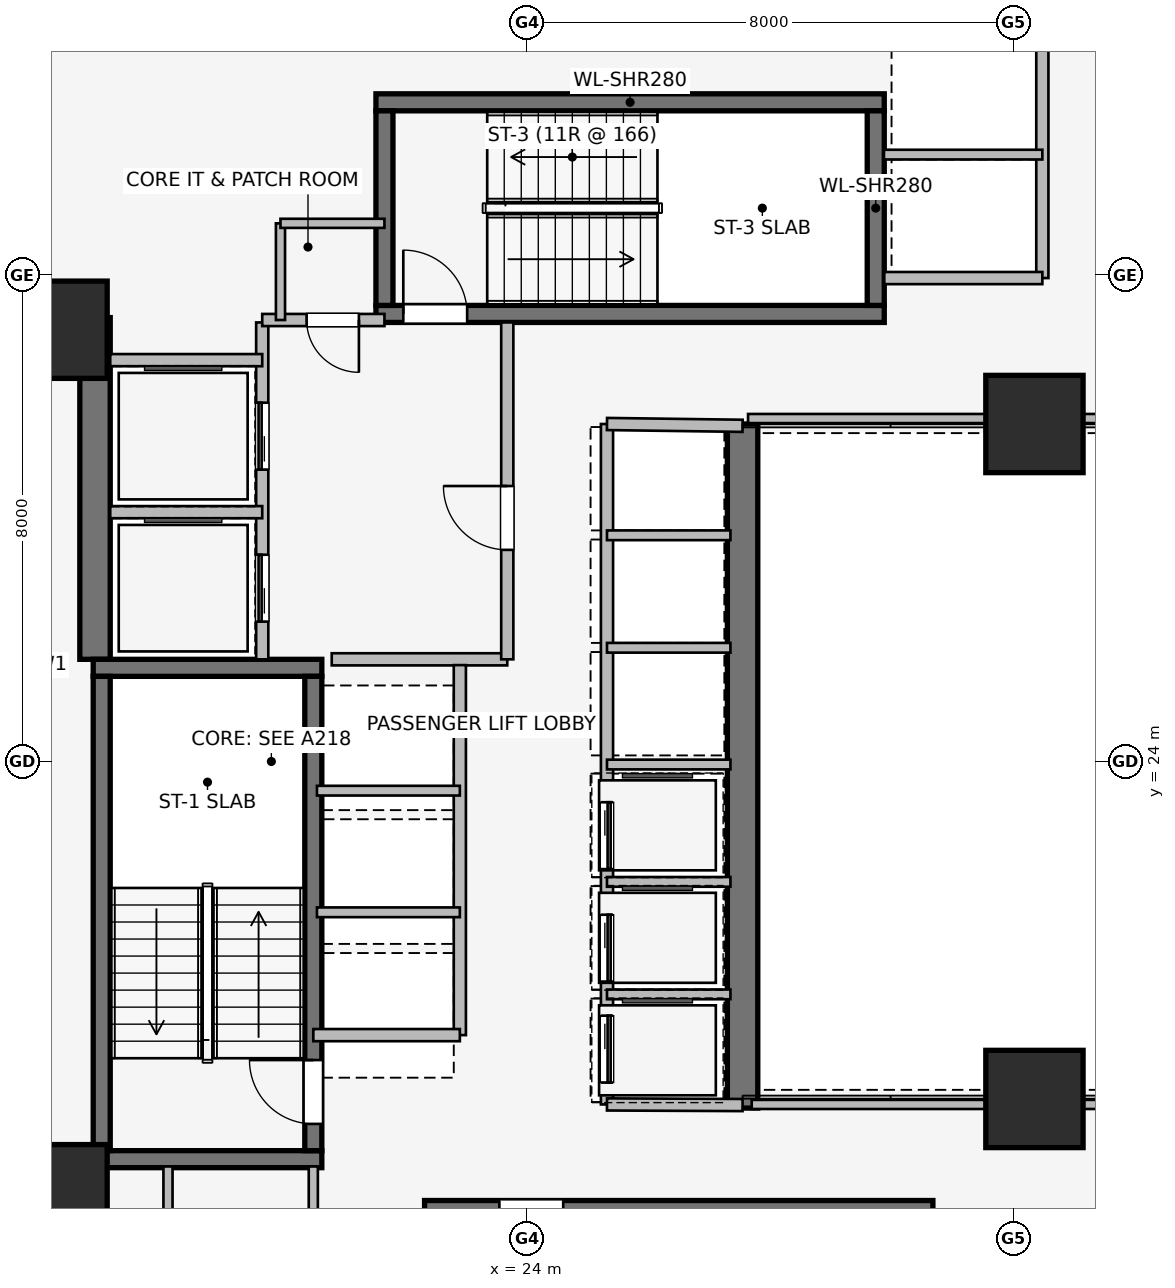
"""IFC4 building model, lengths in metres.
Left out: names, types, materials, properties, quantities, classifications, styles, units other than length and angle.
Written with IfcOpenShell. Run it as: python <this file> out.ifc"""

import sys

from ifc_helpers import new_model, si_unit, direction, frame, frame_2d, origin, origin_2d, place, context, subcontext, project, spatial, rectangle, extrude, element, fill, save


model = new_model("IFC4")
c1 = context("Model", 3, precision=1e-05, world=origin(), true_north=direction((0.0, 1.0)))
c2 = subcontext(c1, "Body", "Model", "MODEL_VIEW")
j1 = project(units=[si_unit("LENGTHUNIT", "METRE"), si_unit("PLANEANGLEUNIT", "RADIAN")], contexts=[c1])
p1 = place(None, origin())
s1 = spatial("IfcSite", under=j1, at=p1, CompositionType="ELEMENT")
p2 = place(p1, origin())
s2 = spatial("IfcBuilding", under=s1, at=p2, CompositionType="ELEMENT")
p3 = place(p2, frame((0.0, 0.0, 63.5)))
s3 = spatial("IfcBuildingStorey", under=s2, at=p3, CompositionType="ELEMENT", Elevation=63.5)
p4 = place(p3, frame((16.9, 25.68, 0.0), z_axis=(0.0, 0.0, 1.0), x_axis=(0.0, 1.0, 0.0)))
e1 = element("IfcWall", 1, at=p4, inside=s3, PredefinedType="SHEAR", context=c2, shape_type="SweptSolid", body=[
    extrude(rectangle(XDim=5.62, YDim=0.5, at=frame_2d((2.81, 0.0))), origin(), (0.0, 0.0, 1.0), 3.65),
])
p5 = place(p3, frame((27.55, 29.55, 0.0), z_axis=(0.0, 0.0, 1.0), x_axis=(0.0, -1.0, 0.0)))
e2 = element("IfcWall", 2, at=p5, inside=s3, PredefinedType="SHEAR", context=c2, shape_type="SweptSolid", body=[
    extrude(rectangle(XDim=11.25, YDim=0.5, at=frame_2d((5.625, 0.0))), origin(), (0.0, 0.0, 1.0), 3.65),
])
for number, where, z_axis, x_axis in (
    (3, (16.87, 17.46, 0.0), (0.0, 0.0, 1.0), (1.0, 0.0, 0.0)),
    (4, (20.63, 25.54, 0.0), (0.0, 0.0, 1.0), (-1.0, 0.0, 0.0)),
):
    element("IfcWall", number, at=place(p3, frame(where, z_axis=z_axis, x_axis=x_axis)), inside=s3, PredefinedType="SHEAR", context=c2, shape_type="SweptSolid", body=[
        extrude(rectangle(XDim=3.76, YDim=0.28, at=frame_2d((1.88, 0.0))), origin(), (0.0, 0.0, 1.0), 3.65),
    ])
p6 = place(p3, frame((17.01, 25.4, 0.0), z_axis=(0.0, 0.0, 1.0), x_axis=(0.0, -1.0, 0.0)))
e5 = element("IfcWall", 5, at=p6, inside=s3, PredefinedType="SHEAR", context=c2, shape_type="SweptSolid", body=[
    extrude(rectangle(XDim=7.8, YDim=0.28, at=frame_2d((3.9, 0.0))), origin(), (0.0, 0.0, 1.0), 3.65),
])
p7 = place(p3, frame((20.49, 17.6, 0.0), z_axis=(0.0, 0.0, 1.0), x_axis=(0.0, 1.0, 0.0)))
e6 = element("IfcWall", 6, at=p7, inside=s3, PredefinedType="SHEAR", context=c2, shape_type="SweptSolid", body=[
    extrude(rectangle(XDim=7.8, YDim=0.28, at=frame_2d((3.9, 0.0))), origin(), (0.0, 0.0, 1.0), 3.65),
])
p8 = place(p7, frame((0.44, 0.0, 0.0)))
e7 = element("IfcOpeningElement", 7, at=p8, cuts=e6, PredefinedType="OPENING", context=c2, shape_type="SweptSolid", body=[
    extrude(rectangle(XDim=1.05, YDim=2.0, at=frame_2d((0.525, 1.0))), frame((0.0, 0.15, 0.0), z_axis=(0.0, -1.0, 0.0), x_axis=(1.0, 0.0, 0.0)), (0.0, 0.0, 1.0), 0.3),
])
p9 = place(p3, frame((30.68, 16.64, 0.0), z_axis=(0.0, 0.0, 1.0), x_axis=(-1.0, 0.0, 0.0)))
e8 = element("IfcWall", 8, at=p9, inside=s3, PredefinedType="SHEAR", context=c2, shape_type="SweptSolid", body=[
    extrude(rectangle(XDim=8.36, YDim=0.28, at=frame_2d((4.18, 0.0))), origin(), (0.0, 0.0, 1.0), 3.65),
])
p10 = place(p9, frame((6.08, 0.0, 0.0)))
e9 = element("IfcOpeningElement", 9, at=p10, cuts=e8, PredefinedType="OPENING", context=c2, shape_type="SweptSolid", body=[
    extrude(rectangle(XDim=1.05, YDim=2.0, at=frame_2d((0.525, 1.0))), frame((0.0, 0.15, 0.0), z_axis=(0.0, -1.0, 0.0), x_axis=(1.0, 0.0, 0.0)), (0.0, 0.0, 1.0), 0.3),
])
p11 = place(p3, frame((21.52, 31.36, 0.0), z_axis=(0.0, 0.0, 1.0), x_axis=(1.0, 0.0, 0.0)))
e10 = element("IfcWall", 10, at=p11, inside=s3, PredefinedType="SHEAR", context=c2, shape_type="SweptSolid", body=[
    extrude(rectangle(XDim=8.36, YDim=0.28, at=frame_2d((4.18, 0.0))), origin(), (0.0, 0.0, 1.0), 3.65),
])
p12 = place(p11, frame((0.45, 0.0, 0.0)))
e11 = element("IfcOpeningElement", 11, at=p12, cuts=e10, PredefinedType="OPENING", context=c2, shape_type="SweptSolid", body=[
    extrude(rectangle(XDim=1.05, YDim=2.0, at=frame_2d((0.525, 1.0))), frame((0.0, 0.15, 0.0), z_axis=(0.0, -1.0, 0.0), x_axis=(1.0, 0.0, 0.0)), (0.0, 0.0, 1.0), 0.3),
])
p13 = place(p3, frame((29.88, 34.84, 0.0), z_axis=(0.0, 0.0, 1.0), x_axis=(-1.0, 0.0, 0.0)))
e12 = element("IfcWall", 12, at=p13, inside=s3, PredefinedType="SHEAR", context=c2, shape_type="SweptSolid", body=[
    extrude(rectangle(XDim=8.36, YDim=0.28, at=frame_2d((4.18, 0.0))), origin(), (0.0, 0.0, 1.0), 3.65),
])
for number, where, z_axis, x_axis in (
    (13, (21.66, 34.7, 0.0), (0.0, 0.0, 1.0), (0.0, -1.0, 0.0)),
    (14, (29.74, 31.5, 0.0), (0.0, 0.0, 1.0), (0.0, 1.0, 0.0)),
):
    element("IfcWall", number, at=place(p3, frame(where, z_axis=z_axis, x_axis=x_axis)), inside=s3, PredefinedType="SHEAR", context=c2, shape_type="SweptSolid", body=[
        extrude(rectangle(XDim=3.2, YDim=0.28, at=frame_2d((1.6, 0.0))), origin(), (0.0, 0.0, 1.0), 3.65),
    ])
for number, where, z_axis, x_axis in (
    (15, (16.3, 16.9, 0.0), (0.0, 0.0, 1.0), (1.0, 0.0, 0.0)),
    (16, (16.3, 31.1, 0.0), (0.0, 0.0, 1.0), (1.0, 0.0, 0.0)),
    (17, (32.35, 18.45, 0.0), (0.0, 0.0, 1.0), (1.0, 0.0, 0.0)),
    (18, (32.35, 29.55, 0.0), (0.0, 0.0, 1.0), (1.0, 0.0, 0.0)),
):
    element("IfcColumn", number, at=place(p3, frame(where, z_axis=z_axis, x_axis=x_axis)), inside=s3, PredefinedType="COLUMN", context=c2, shape_type="SweptSolid", body=[
        extrude(rectangle(XDim=1.6, YDim=1.6, at=origin_2d()), origin(), (0.0, 0.0, 1.0), 3.65),
    ])
p14 = place(p3, frame((19.65, 25.68, 0.0), z_axis=(0.0, 0.0, 1.0), x_axis=(0.0, 1.0, 0.0)))
e19 = element("IfcWall", 19, at=p14, inside=s3, PredefinedType="PARTITIONING", context=c2, shape_type="SweptSolid", body=[
    extrude(rectangle(XDim=5.54, YDim=0.2, at=frame_2d((2.77, 0.0))), origin(), (0.0, 0.0, 1.0), 3.39),
])
p15 = place(p14, frame((0.62, 0.0, 0.0)))
e20 = element("IfcOpeningElement", 20, at=p15, cuts=e19, PredefinedType="OPENING", context=c2, shape_type="SweptSolid", body=[
    extrude(rectangle(XDim=1.1, YDim=2.2, at=frame_2d((0.55, 1.1))), frame((0.0, 0.11, 0.0), z_axis=(0.0, -1.0, 0.0), x_axis=(1.0, 0.0, 0.0)), (0.0, 0.0, 1.0), 0.22),
])
p16 = place(p14, frame((3.12, 0.0, 0.0)))
e21 = element("IfcOpeningElement", 21, at=p16, cuts=e19, PredefinedType="OPENING", context=c2, shape_type="SweptSolid", body=[
    extrude(rectangle(XDim=1.1, YDim=2.2, at=frame_2d((0.55, 1.1))), frame((0.0, 0.11, 0.0), z_axis=(0.0, -1.0, 0.0), x_axis=(1.0, 0.0, 0.0)), (0.0, 0.0, 1.0), 0.22),
])
p17 = place(p3, frame((20.793, 25.68, 0.0), z_axis=(0.0, 0.0, 1.0), x_axis=(1.0, 0.0, 0.0)))
e22 = element("IfcWall", 22, at=p17, inside=s3, PredefinedType="PARTITIONING", context=c2, shape_type="SweptSolid", body=[
    extrude(rectangle(XDim=2.887, YDim=0.2, at=frame_2d((1.443, 0.0))), origin(), (0.0, 0.0, 1.0), 3.39),
])
p18 = place(p3, frame((23.68, 25.68, 0.0), z_axis=(0.0, 0.0, 1.0), x_axis=(0.0, 1.0, 0.0)))
e23 = element("IfcWall", 23, at=p18, inside=s3, PredefinedType="PARTITIONING", context=c2, shape_type="SweptSolid", body=[
    extrude(rectangle(XDim=5.54, YDim=0.2, at=frame_2d((2.77, 0.0))), origin(), (0.0, 0.0, 1.0), 3.39),
])
p19 = place(p18, frame((1.8, 0.0, 0.0)))
e24 = element("IfcOpeningElement", 24, at=p19, cuts=e23, PredefinedType="OPENING", context=c2, shape_type="SweptSolid", body=[
    extrude(rectangle(XDim=1.05, YDim=2.0, at=frame_2d((0.525, 1.0))), frame((0.0, 0.11, 0.0), z_axis=(0.0, -1.0, 0.0), x_axis=(1.0, 0.0, 0.0)), (0.0, 0.0, 1.0), 0.22),
])
p20 = place(p3, frame((21.66, 31.26, 0.0), z_axis=(0.0, 0.0, 1.0), x_axis=(-1.0, 0.0, 0.0)))
e25 = element("IfcWall", 25, at=p20, inside=s3, PredefinedType="PARTITIONING", context=c2, shape_type="SweptSolid", body=[
    extrude(rectangle(XDim=2.01, YDim=0.2, at=frame_2d((1.005, 0.0))), origin(), (0.0, 0.0, 1.0), 3.39),
])
p21 = place(p20, frame((0.42, 0.0, 0.0)))
e26 = element("IfcOpeningElement", 26, at=p21, cuts=e25, PredefinedType="OPENING", context=c2, shape_type="SweptSolid", body=[
    extrude(rectangle(XDim=0.86, YDim=2.0, at=frame_2d((0.43, 1.0))), frame((0.0, 0.11, 0.0), z_axis=(0.0, -1.0, 0.0), x_axis=(1.0, 0.0, 0.0)), (0.0, 0.0, 1.0), 0.22),
])
p22 = place(p3, frame((17.15, 28.1, 0.0), z_axis=(0.0, 0.0, 1.0), x_axis=(1.0, 0.0, 0.0)))
e27 = element("IfcWall", 27, at=p22, inside=s3, PredefinedType="PARTITIONING", context=c2, shape_type="SweptSolid", body=[
    extrude(rectangle(XDim=2.5, YDim=0.2, at=frame_2d((1.25, 0.0))), origin(), (0.0, 0.0, 1.0), 3.39),
])
p23 = place(p3, frame((19.65, 30.6, 0.0), z_axis=(0.0, 0.0, 1.0), x_axis=(-1.0, 0.0, 0.0)))
e28 = element("IfcWall", 28, at=p23, inside=s3, PredefinedType="PARTITIONING", context=c2, shape_type="SweptSolid", body=[
    extrude(rectangle(XDim=2.5, YDim=0.2, at=frame_2d((1.25, 0.0))), origin(), (0.0, 0.0, 1.0), 2.29),
])
p24 = place(p3, frame((32.48, 31.95, 0.0), z_axis=(0.0, 0.0, 1.0), x_axis=(0.0, 1.0, 0.0)))
e29 = element("IfcWall", 29, at=p24, inside=s3, PredefinedType="PARTITIONING", context=c2, shape_type="SweptSolid", body=[
    extrude(rectangle(XDim=4.05, YDim=0.2, at=frame_2d((2.025, 0.0))), origin(), (0.0, 0.0, 1.0), 2.513),
])
p25 = place(p3, frame((32.48, 31.95, 0.0), z_axis=(0.0, 0.0, 1.0), x_axis=(-1.0, 0.0, 0.0)))
e30 = element("IfcWall", 30, at=p25, inside=s3, PredefinedType="PARTITIONING", context=c2, shape_type="SweptSolid", body=[
    extrude(rectangle(XDim=2.6, YDim=0.2, at=frame_2d((1.3, 0.0))), origin(), (0.0, 0.0, 1.0), 3.39),
])
p26 = place(p3, frame((29.875, 33.98, 0.0), z_axis=(0.0, 0.0, 1.0), x_axis=(1.0, 0.0, 0.0)))
e31 = element("IfcWall", 31, at=p26, inside=s3, PredefinedType="PARTITIONING", context=c2, shape_type="SweptSolid", body=[
    extrude(rectangle(XDim=2.605, YDim=0.16, at=frame_2d((1.302, 0.0))), origin(), (0.0, 0.0, 1.0), 3.39),
])
p27 = place(p3, frame((22.9, 19.5, 0.0), z_axis=(0.0, 0.0, 1.0), x_axis=(0.0, 1.0, 0.0)))
e32 = element("IfcWall", 32, at=p27, inside=s3, PredefinedType="PARTITIONING", context=c2, shape_type="SweptSolid", body=[
    extrude(rectangle(XDim=6.085, YDim=0.2, at=frame_2d((3.042, 0.0))), origin(), (0.0, 0.0, 1.0), 3.39),
])
p28 = place(p3, frame((20.49, 19.5, 0.0), z_axis=(0.0, 0.0, 1.0), x_axis=(1.0, 0.0, 0.0)))
e33 = element("IfcWall", 33, at=p28, inside=s3, PredefinedType="PARTITIONING", context=c2, shape_type="SweptSolid", body=[
    extrude(rectangle(XDim=2.41, YDim=0.2, at=frame_2d((1.205, 0.0))), origin(), (0.0, 0.0, 1.0), 2.29),
])
for number, where, z_axis, x_axis in (
    (34, (20.55, 21.52, 0.0), (0.0, 0.0, 1.0), (1.0, 0.0, 0.0)),
    (35, (20.55, 23.52, 0.0), (0.0, 0.0, 1.0), (1.0, 0.0, 0.0)),
):
    element("IfcWall", number, at=place(p3, frame(where, z_axis=z_axis, x_axis=x_axis)), inside=s3, PredefinedType="PARTITIONING", context=c2, shape_type="SweptSolid", body=[
        extrude(rectangle(XDim=2.35, YDim=0.16, at=frame_2d((1.175, 0.0))), origin(), (0.0, 0.0, 1.0), 3.39),
    ])
p29 = place(p3, frame((25.32, 29.55, 0.0), z_axis=(0.0, 0.0, 1.0), x_axis=(0.0, -1.0, 0.0)))
e36 = element("IfcWall", 36, at=p29, inside=s3, PredefinedType="PARTITIONING", context=c2, shape_type="SweptSolid", body=[
    extrude(rectangle(XDim=11.19, YDim=0.2, at=frame_2d((5.595, 0.0))), origin(), (0.0, 0.0, 1.0), 3.39),
])
p30 = place(p29, frame((6.22, 0.0, 0.0)))
e37 = element("IfcOpeningElement", 37, at=p30, cuts=e36, PredefinedType="OPENING", context=c2, shape_type="SweptSolid", body=[
    extrude(rectangle(XDim=1.1, YDim=2.2, at=frame_2d((0.55, 1.1))), frame((0.0, 0.11, 0.0), z_axis=(0.0, -1.0, 0.0), x_axis=(1.0, 0.0, 0.0)), (0.0, 0.0, 1.0), 0.22),
])
p31 = place(p29, frame((8.07, 0.0, 0.0)))
e38 = element("IfcOpeningElement", 38, at=p31, cuts=e36, PredefinedType="OPENING", context=c2, shape_type="SweptSolid", body=[
    extrude(rectangle(XDim=1.1, YDim=2.2, at=frame_2d((0.55, 1.1))), frame((0.0, 0.11, 0.0), z_axis=(0.0, -1.0, 0.0), x_axis=(1.0, 0.0, 0.0)), (0.0, 0.0, 1.0), 0.22),
])
p32 = place(p29, frame((9.73, 0.0, 0.0)))
e39 = element("IfcOpeningElement", 39, at=p32, cuts=e36, PredefinedType="OPENING", context=c2, shape_type="SweptSolid", body=[
    extrude(rectangle(XDim=1.1, YDim=2.2, at=frame_2d((0.55, 1.1))), frame((0.0, 0.11, 0.0), z_axis=(0.0, -1.0, 0.0), x_axis=(1.0, 0.0, 0.0)), (0.0, 0.0, 1.0), 0.22),
])
p33 = place(p3, frame((25.32, 18.36, 0.0), z_axis=(0.0, 0.0, 1.0), x_axis=(0.999989925833, -0.004488678231, 0.0)))
e40 = element("IfcWall", 40, at=p33, inside=s3, PredefinedType="PARTITIONING", context=c2, shape_type="SweptSolid", body=[
    extrude(rectangle(XDim=2.23, YDim=0.2, at=frame_2d((1.115, 0.0))), origin(), (0.0, 0.0, 1.0), 3.39),
])
p34 = place(p3, frame((27.55, 29.52, 0.0), z_axis=(0.0, 0.0, 1.0), x_axis=(-0.999909343457, 0.013464949556, 0.0)))
e41 = element("IfcWall", 41, at=p34, inside=s3, PredefinedType="PARTITIONING", context=c2, shape_type="SweptSolid", body=[
    extrude(rectangle(XDim=2.23, YDim=0.2, at=frame_2d((1.115, 0.0))), origin(), (0.0, 0.0, 1.0), 2.29),
])
for number, where, z_axis, x_axis in (
    (42, (25.32, 20.17, 0.0), (0.0, 0.0, 1.0), (1.0, 0.0, 0.0)),
    (43, (25.32, 22.02, 0.0), (0.0, 0.0, 1.0), (1.0, 0.0, 0.0)),
    (44, (25.32, 23.95, 0.0), (0.0, 0.0, 1.0), (1.0, 0.0, 0.0)),
    (45, (25.32, 25.87, 0.0), (0.0, 0.0, 1.0), (1.0, 0.0, 0.0)),
    (46, (25.32, 27.72, 0.0), (0.0, 0.0, 1.0), (1.0, 0.0, 0.0)),
):
    element("IfcWall", number, at=place(p3, frame(where, z_axis=z_axis, x_axis=x_axis)), inside=s3, PredefinedType="PARTITIONING", context=c2, shape_type="SweptSolid", body=[
        extrude(rectangle(XDim=2.03, YDim=0.16, at=frame_2d((1.015, 0.0))), origin(), (0.0, 0.0, 1.0), 3.39),
    ])
p35 = place(p3, frame((18.1, 17.34, 0.0), z_axis=(0.0, 0.0, 1.0), x_axis=(0.0, -1.0, 0.0)))
e47 = element("IfcWall", 47, at=p35, inside=s3, PredefinedType="PARTITIONING", context=c2, shape_type="SweptSolid", body=[
    extrude(rectangle(XDim=4.14, YDim=0.15, at=frame_2d((2.07, 0.0))), origin(), (0.0, 0.0, 1.0), 3.39),
])
p36 = place(p3, frame((20.49, 13.2, 0.0), z_axis=(0.0, 0.0, 1.0), x_axis=(0.0, 1.0, 0.0)))
e48 = element("IfcWall", 48, at=p36, inside=s3, PredefinedType="PARTITIONING", context=c2, shape_type="SweptSolid", body=[
    extrude(rectangle(XDim=4.14, YDim=0.15, at=frame_2d((2.07, 0.0))), origin(), (0.0, 0.0, 1.0), 3.39),
])
p37 = place(p36, frame((1.25, 0.0, 0.0)))
e49 = element("IfcOpeningElement", 49, at=p37, cuts=e48, PredefinedType="OPENING", context=c2, shape_type="SweptSolid", body=[
    extrude(rectangle(XDim=0.9, YDim=2.0, at=frame_2d((0.45, 1.0))), frame((0.0, 0.085, 0.0), z_axis=(0.0, -1.0, 0.0), x_axis=(1.0, 0.0, 0.0)), (0.0, 0.0, 1.0), 0.17),
])
p38 = place(p3, frame((19.95, 32.85, 0.0), z_axis=(0.0, 0.0, 1.0), x_axis=(0.0, -1.0, 0.0)))
e50 = element("IfcWall", 50, at=p38, inside=s3, PredefinedType="PARTITIONING", context=c2, shape_type="SweptSolid", body=[
    extrude(rectangle(XDim=1.59, YDim=0.15, at=frame_2d((0.795, 0.0))), origin(), (0.0, 0.0, 1.0), 3.39),
])
p39 = place(p3, frame((21.66, 32.85, 0.0), z_axis=(0.0, 0.0, 1.0), x_axis=(-1.0, 0.0, 0.0)))
e51 = element("IfcWall", 51, at=p39, inside=s3, PredefinedType="PARTITIONING", context=c2, shape_type="SweptSolid", body=[
    extrude(rectangle(XDim=1.71, YDim=0.15, at=frame_2d((0.855, 0.0))), origin(), (0.0, 0.0, 1.0), 3.39),
])
p40 = place(p3, frame((27.7, 18.36, 0.0), z_axis=(0.0, 0.0, 1.0), x_axis=(1.0, 0.0, 0.0)))
e52 = element("IfcWall", 52, at=p40, inside=s3, PredefinedType="PARTITIONING", context=c2, shape_type="SweptSolid", body=[
    extrude(rectangle(XDim=12.14, YDim=0.15, at=frame_2d((6.07, 0.0))), origin(), (0.0, 0.0, 1.0), 2.531),
])
p41 = place(p3, frame((39.84, 29.64, 0.0), z_axis=(0.0, 0.0, 1.0), x_axis=(-1.0, 0.0, 0.0)))
e53 = element("IfcWall", 53, at=p41, inside=s3, PredefinedType="PARTITIONING", context=c2, shape_type="SweptSolid", body=[
    extrude(rectangle(XDim=12.2, YDim=0.15, at=frame_2d((6.1, 0.0))), origin(), (0.0, 0.0, 1.0), 2.531),
])
p42 = place(p8, origin())
e54 = element("IfcDoor", 54, at=p42, inside=s3, OperationType="SINGLE_SWING_RIGHT", PredefinedType="DOOR", context=c2, shape_type="SweptSolid", body=[
    extrude(rectangle(XDim=1.05, YDim=2.0, at=frame_2d((0.525, 1.0))), frame((0.0, 0.025, 0.0), z_axis=(0.0, -1.0, 0.0), x_axis=(1.0, 0.0, 0.0)), (0.0, 0.0, 1.0), 0.05),
])
fill(e7, e54)
p43 = place(p10, origin())
e55 = element("IfcDoor", 55, at=p43, inside=s3, OperationType="SINGLE_SWING_RIGHT", PredefinedType="DOOR", context=c2, shape_type="SweptSolid", body=[
    extrude(rectangle(XDim=1.05, YDim=2.0, at=frame_2d((0.525, 1.0))), frame((0.0, 0.025, 0.0), z_axis=(0.0, -1.0, 0.0), x_axis=(1.0, 0.0, 0.0)), (0.0, 0.0, 1.0), 0.05),
])
fill(e9, e55)
p44 = place(p12, origin())
e56 = element("IfcDoor", 56, at=p44, inside=s3, OperationType="SINGLE_SWING_LEFT", PredefinedType="DOOR", context=c2, shape_type="SweptSolid", body=[
    extrude(rectangle(XDim=1.05, YDim=2.0, at=frame_2d((0.525, 1.0))), frame((0.0, 0.025, 0.0), z_axis=(0.0, -1.0, 0.0), x_axis=(1.0, 0.0, 0.0)), (0.0, 0.0, 1.0), 0.05),
])
fill(e11, e56)
p45 = place(p15, origin())
e57 = element("IfcDoor", 57, at=p45, inside=s3, OperationType="SLIDING_TO_LEFT", PredefinedType="DOOR", context=c2, shape_type="SweptSolid", body=[
    extrude(rectangle(XDim=1.1, YDim=2.2, at=frame_2d((0.55, 1.1))), frame((0.0, 0.025, 0.0), z_axis=(0.0, -1.0, 0.0), x_axis=(1.0, 0.0, 0.0)), (0.0, 0.0, 1.0), 0.05),
])
fill(e20, e57)
p46 = place(p16, origin())
e58 = element("IfcDoor", 58, at=p46, inside=s3, OperationType="SLIDING_TO_LEFT", PredefinedType="DOOR", context=c2, shape_type="SweptSolid", body=[
    extrude(rectangle(XDim=1.1, YDim=2.2, at=frame_2d((0.55, 1.1))), frame((0.0, 0.025, 0.0), z_axis=(0.0, -1.0, 0.0), x_axis=(1.0, 0.0, 0.0)), (0.0, 0.0, 1.0), 0.05),
])
fill(e21, e58)
p47 = place(p19, origin())
e59 = element("IfcDoor", 59, at=p47, inside=s3, OperationType="SINGLE_SWING_RIGHT", PredefinedType="DOOR", context=c2, shape_type="SweptSolid", body=[
    extrude(rectangle(XDim=1.05, YDim=2.0, at=frame_2d((0.525, 1.0))), frame((0.0, 0.025, 0.0), z_axis=(0.0, -1.0, 0.0), x_axis=(1.0, 0.0, 0.0)), (0.0, 0.0, 1.0), 0.05),
])
fill(e24, e59)
p48 = place(p21, origin())
e60 = element("IfcDoor", 60, at=p48, inside=s3, OperationType="SINGLE_SWING_LEFT", PredefinedType="DOOR", context=c2, shape_type="SweptSolid", body=[
    extrude(rectangle(XDim=0.86, YDim=2.0, at=frame_2d((0.43, 1.0))), frame((0.0, 0.025, 0.0), z_axis=(0.0, -1.0, 0.0), x_axis=(1.0, 0.0, 0.0)), (0.0, 0.0, 1.0), 0.05),
])
fill(e26, e60)
p49 = place(p30, origin())
e61 = element("IfcDoor", 61, at=p49, inside=s3, OperationType="SLIDING_TO_LEFT", PredefinedType="DOOR", context=c2, shape_type="SweptSolid", body=[
    extrude(rectangle(XDim=1.1, YDim=2.2, at=frame_2d((0.55, 1.1))), frame((0.0, 0.025, 0.0), z_axis=(0.0, -1.0, 0.0), x_axis=(1.0, 0.0, 0.0)), (0.0, 0.0, 1.0), 0.05),
])
fill(e37, e61)
p50 = place(p31, origin())
e62 = element("IfcDoor", 62, at=p50, inside=s3, OperationType="SLIDING_TO_LEFT", PredefinedType="DOOR", context=c2, shape_type="SweptSolid", body=[
    extrude(rectangle(XDim=1.1, YDim=2.2, at=frame_2d((0.55, 1.1))), frame((0.0, 0.025, 0.0), z_axis=(0.0, -1.0, 0.0), x_axis=(1.0, 0.0, 0.0)), (0.0, 0.0, 1.0), 0.05),
])
fill(e38, e62)
p51 = place(p32, origin())
e63 = element("IfcDoor", 63, at=p51, inside=s3, OperationType="SLIDING_TO_LEFT", PredefinedType="DOOR", context=c2, shape_type="SweptSolid", body=[
    extrude(rectangle(XDim=1.1, YDim=2.2, at=frame_2d((0.55, 1.1))), frame((0.0, 0.025, 0.0), z_axis=(0.0, -1.0, 0.0), x_axis=(1.0, 0.0, 0.0)), (0.0, 0.0, 1.0), 0.05),
])
fill(e39, e63)
save(model, sys.argv[1])
